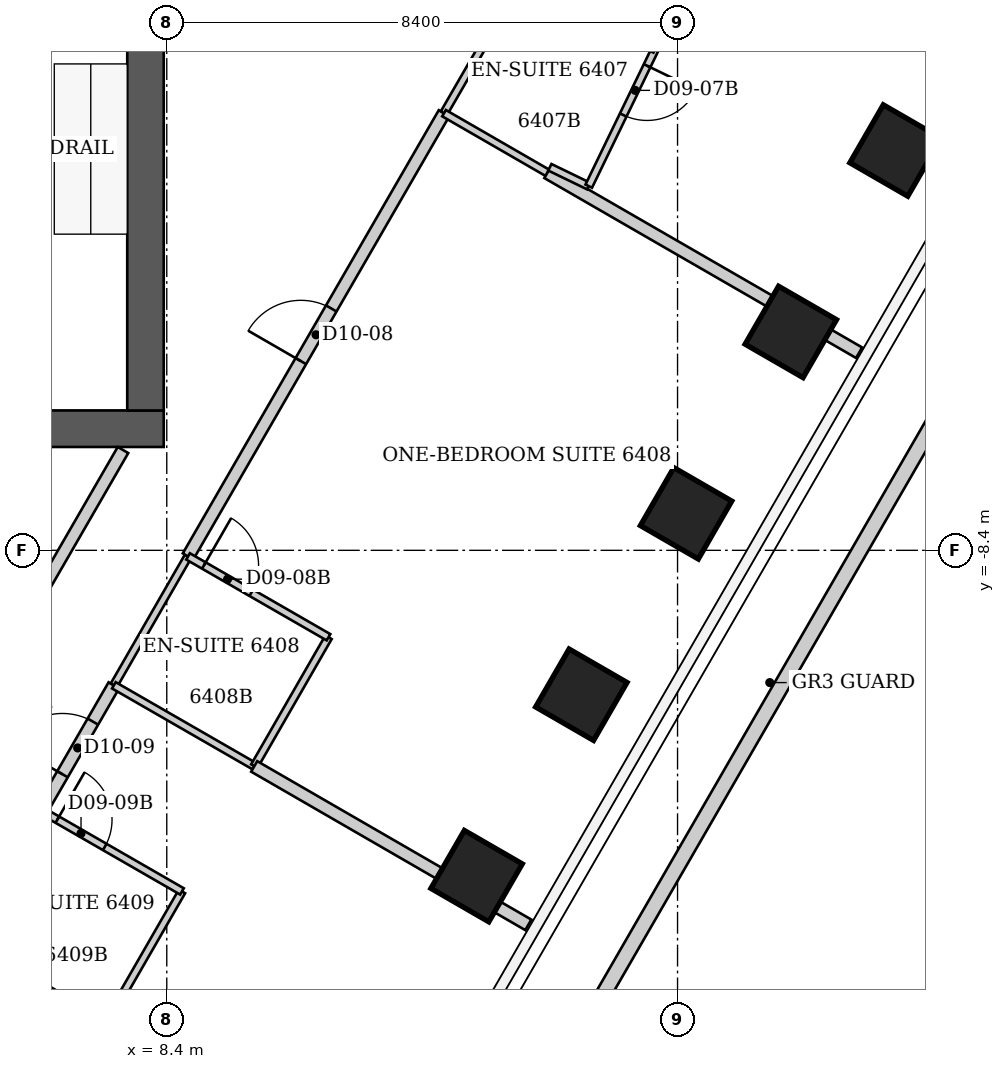
"""IFC4 building model, lengths in metres.
Left out: names, types, materials, properties, quantities, classifications, styles, units other than length and angle.
Written with IfcOpenShell. Run it as: python <this file> out.ifc"""

import sys

from ifc_helpers import new_model, si_unit, direction, frame, frame_2d, origin, origin_2d, place, context, subcontext, project, spatial, rectangle, extrude, clip, halfspace, element, fill, save


model = new_model("IFC4")
c1 = context("Model", 3, precision=1e-05, world=origin(), true_north=direction((0.0, 1.0)))
c2 = subcontext(c1, "Body", "Model", "MODEL_VIEW")
j1 = project(units=[si_unit("LENGTHUNIT", "METRE"), si_unit("PLANEANGLEUNIT", "RADIAN")], contexts=[c1])
p1 = place(None, origin())
s1 = spatial("IfcSite", under=j1, at=p1, CompositionType="ELEMENT")
p2 = place(p1, origin())
s2 = spatial("IfcBuilding", under=s1, at=p2, CompositionType="ELEMENT")
p3 = place(p2, frame((0.0, 0.0, 257.0)))
s3 = spatial("IfcBuildingStorey", under=s2, at=p3, CompositionType="ELEMENT", Elevation=257.0)
p4 = place(p3, frame((20.385, -1.824, -0.06), z_axis=(0.0, 0.0, 1.0), x_axis=(0.866025403784, -0.5, 0.0)))
e1 = element("IfcColumn", 1, at=p4, inside=s3, PredefinedType="COLUMN", context=c2, shape_type="SweptSolid", body=[
    clip(extrude(rectangle(XDim=1.1, YDim=1.1, at=origin_2d()), origin(), (0.0, 0.0, 1.0), 3.86), halfspace(frame((0.0, 0.0, 0.06)), True)),
])
p5 = place(p3, frame((18.663, -4.808, -0.052), z_axis=(0.0, 0.0, 1.0), x_axis=(0.866025403784, -0.5, 0.0)))
e2 = element("IfcColumn", 2, at=p5, inside=s3, PredefinedType="COLUMN", context=c2, shape_type="SweptSolid", body=[
    clip(extrude(rectangle(XDim=1.1, YDim=1.1, at=origin_2d()), origin(), (0.0, 0.0, 1.0), 3.852), halfspace(frame((0.0, 0.0, 0.052)), True)),
])
for number, where, z_axis, x_axis in (
    (3, (16.94, -7.792, -0.045), (0.0, 0.0, 1.0), (0.866, -0.5, 0.0)),
    (4, (15.218, -10.775, -0.045), (0.0, 0.0, 1.0), (0.866, -0.5, 0.0)),
):
    element("IfcColumn", number, at=place(p3, frame(where, z_axis=z_axis, x_axis=x_axis)), inside=s3, PredefinedType="COLUMN", context=c2, shape_type="SweptSolid", body=[
        clip(extrude(rectangle(XDim=1.1, YDim=1.1, at=origin_2d()), origin(), (0.0, 0.0, 1.0), 3.845), halfspace(frame((0.0, 0.0, 0.045)), True)),
    ])
p6 = place(p3, frame((13.495, -13.759, -0.052), z_axis=(0.0, 0.0, 1.0), x_axis=(0.866025403784, -0.5, 0.0)))
e5 = element("IfcColumn", 5, at=p6, inside=s3, PredefinedType="COLUMN", context=c2, shape_type="SweptSolid", body=[
    clip(extrude(rectangle(XDim=1.1, YDim=1.1, at=origin_2d()), origin(), (0.0, 0.0, 1.0), 3.852), halfspace(frame((0.0, 0.0, 0.052)), True)),
])
p7 = place(p3, frame((-8.35, -6.4, 0.0), z_axis=(0.0, 0.0, 1.0), x_axis=(1.0, 0.0, 0.0)))
e6 = element("IfcWall", 6, at=p7, inside=s3, PredefinedType="SHEAR", context=c2, shape_type="SweptSolid", body=[
    extrude(rectangle(XDim=16.7, YDim=0.6, at=frame_2d((8.35, 0.0))), origin(), (0.0, 0.0, 1.0), 3.8),
])
p8 = place(p3, frame((8.05, -6.1, 0.0), z_axis=(0.0, 0.0, 1.0), x_axis=(0.0, 1.0, 0.0)))
e7 = element("IfcWall", 7, at=p8, inside=s3, PredefinedType="SHEAR", context=c2, shape_type="SweptSolid", body=[
    extrude(rectangle(XDim=12.2, YDim=0.6, at=frame_2d((6.1, 0.0))), origin(), (0.0, 0.0, 1.0), 3.8),
])
p9 = place(p8, frame((7.6, 0.0, 0.0)))
e8 = element("IfcOpeningElement", 8, at=p9, cuts=e7, PredefinedType="OPENING", context=c2, shape_type="SweptSolid", body=[
    extrude(rectangle(XDim=1.2, YDim=2.2, at=frame_2d((0.6, 1.1))), frame((0.0, 0.3, 0.0), z_axis=(0.0, -1.0, 0.0), x_axis=(1.0, 0.0, 0.0)), (0.0, 0.0, 1.0), 0.6),
])
p10 = place(p3, frame((9.75, -25.8, 0.0), z_axis=(0.0, 0.0, 1.0), x_axis=(0.499998496786, 0.866026271663, 0.0)))
e9 = element("IfcWall", 9, at=p10, inside=s3, PredefinedType="PARAPET", context=c2, shape_type="SweptSolid", body=[
    extrude(rectangle(XDim=34.936, YDim=0.25, at=frame_2d((17.468, 0.0))), origin(), (0.0, 0.0, 1.0), 1.1),
])
p11 = place(p3, frame((5.233, -14.923, 0.0), z_axis=(0.0, 0.0, 1.0), x_axis=(0.864900876675, -0.501942699445, 0.0)))
e10 = element("IfcWall", 10, at=p11, inside=s3, PredefinedType="PARTITIONING", context=c2, shape_type="SweptSolid", body=[
    extrude(rectangle(XDim=2.505, YDim=0.12, at=frame_2d((1.252, 0.0))), origin(), (0.0, 0.0, 1.0), 3.038),
])
p12 = place(p3, frame((6.34, -12.68, 0.0), z_axis=(0.0, 0.0, 1.0), x_axis=(0.500222880675, 0.865896685321, 0.0)))
e11 = element("IfcWall", 11, at=p12, inside=s3, PredefinedType="PARTITIONING", context=c2, shape_type="SweptSolid", body=[
    extrude(rectangle(XDim=2.379, YDim=0.2, at=frame_2d((1.189, 0.0))), origin(), (0.0, 0.0, 1.0), 3.64),
])
p13 = place(p12, frame((0.689, 0.0, 0.0)))
e12 = element("IfcOpeningElement", 12, at=p13, cuts=e11, PredefinedType="OPENING", context=c2, shape_type="SweptSolid", body=[
    extrude(rectangle(XDim=1.0, YDim=2.13, at=frame_2d((0.5, 1.065))), frame((0.0, 0.1, 0.0), z_axis=(0.0, -1.0, 0.0), x_axis=(1.0, 0.0, 0.0)), (0.0, 0.0, 1.0), 0.2),
])
p14 = place(p3, frame((7.4, -16.18, 0.0), z_axis=(0.0, 0.0, 1.0), x_axis=(0.499159685399, 0.866510016372, 0.0)))
e13 = element("IfcWall", 13, at=p14, inside=s3, PredefinedType="PARTITIONING", context=c2, shape_type="SweptSolid", body=[
    extrude(rectangle(XDim=2.504, YDim=0.12, at=frame_2d((1.252, 0.0))), origin(), (0.0, 0.0, 1.0), 3.64),
])
p15 = place(p3, frame((7.53, -10.62, 0.0), z_axis=(0.0, 0.0, 1.0), x_axis=(0.498748634132, 0.866746675766, 0.0)))
e14 = element("IfcWall", 14, at=p15, inside=s3, PredefinedType="PARTITIONING", context=c2, shape_type="SweptSolid", body=[
    extrude(rectangle(XDim=2.446, YDim=0.12, at=frame_2d((1.223, 0.0))), origin(), (0.0, 0.0, 1.0), 3.64),
])
p16 = place(p3, frame((7.53, -10.62, 0.0), z_axis=(0.0, 0.0, 1.0), x_axis=(0.866654860089, -0.498908161372, 0.0)))
e15 = element("IfcWall", 15, at=p16, inside=s3, PredefinedType="PARTITIONING", context=c2, shape_type="SweptSolid", body=[
    extrude(rectangle(XDim=2.666, YDim=0.12, at=frame_2d((1.333, 0.0))), origin(), (0.0, 0.0, 1.0), 3.64),
])
p17 = place(p3, frame((7.68, -6.75, 0.0), z_axis=(0.0, 0.0, 1.0), x_axis=(-0.500174600737, -0.865924574532, 0.0)))
e16 = element("IfcWall", 16, at=p17, inside=s3, PredefinedType="PARTITIONING", context=c2, shape_type="SweptSolid", body=[
    extrude(rectangle(XDim=9.597, YDim=0.2, at=frame_2d((4.798, 0.0))), origin(), (0.0, 0.0, 1.0), 3.64),
])
p18 = place(p17, frame((4.248, 0.0, 0.0)))
e17 = element("IfcOpeningElement", 17, at=p18, cuts=e16, PredefinedType="OPENING", context=c2, shape_type="SweptSolid", body=[
    extrude(rectangle(XDim=1.1, YDim=2.2, at=frame_2d((0.55, 1.1))), frame((0.0, 0.1, 0.0), z_axis=(0.0, -1.0, 0.0), x_axis=(1.0, 0.0, 0.0)), (0.0, 0.0, 1.0), 0.2),
])
p19 = place(p3, frame((8.45, -24.382, 0.0), z_axis=(0.0, 0.0, 1.0), x_axis=(-0.328108256954, 0.944640128154, 0.0)))
e18 = element("IfcWall", 18, at=p19, inside=s3, PredefinedType="PARTITIONING", context=c2, shape_type="SweptSolid", body=[
    extrude(rectangle(XDim=10.059, YDim=0.2, at=frame_2d((5.029, 0.0))), origin(), (0.0, 0.0, 1.0), 3.64),
])
p20 = place(p3, frame((8.65, -14.01, 0.0), z_axis=(0.0, 0.0, 1.0), x_axis=(-0.866592449628, 0.499016559092, 0.0)))
e19 = element("IfcWall", 19, at=p20, inside=s3, PredefinedType="PARTITIONING", context=c2, shape_type="SweptSolid", body=[
    extrude(rectangle(XDim=2.665, YDim=0.12, at=frame_2d((1.333, 0.0))), origin(), (0.0, 0.0, 1.0), 3.64),
])
p21 = place(p20, frame((1.466, 0.0, 0.0)))
e20 = element("IfcOpeningElement", 20, at=p21, cuts=e19, PredefinedType="OPENING", context=c2, shape_type="SweptSolid", body=[
    extrude(rectangle(XDim=0.9, YDim=2.03, at=frame_2d((0.45, 1.015))), frame((0.0, 0.06, 0.0), z_axis=(0.0, -1.0, 0.0), x_axis=(1.0, 0.0, 0.0)), (0.0, 0.0, 1.0), 0.12),
])
p22 = place(p3, frame((8.75, -8.5, 0.0), z_axis=(0.0, 0.0, 1.0), x_axis=(0.500093981358, 0.865971136822, 0.0)))
e21 = element("IfcWall", 21, at=p22, inside=s3, PredefinedType="PARTITIONING", context=c2, shape_type="SweptSolid", body=[
    extrude(rectangle(XDim=8.418, YDim=0.2, at=frame_2d((4.209, 0.0))), origin(), (0.0, 0.0, 1.0), 3.64),
])
p23 = place(p22, frame((3.709, 0.0, 0.0)))
e22 = element("IfcOpeningElement", 22, at=p23, cuts=e21, PredefinedType="OPENING", context=c2, shape_type="SweptSolid", body=[
    extrude(rectangle(XDim=1.0, YDim=2.13, at=frame_2d((0.5, 1.065))), frame((0.0, 0.1, 0.0), z_axis=(0.0, -1.0, 0.0), x_axis=(1.0, 0.0, 0.0)), (0.0, 0.0, 1.0), 0.2),
])
p24 = place(p3, frame((9.84, -11.95, 0.0), z_axis=(0.0, 0.0, 1.0), x_axis=(0.498791783817, 0.866721844883, 0.0)))
e23 = element("IfcWall", 23, at=p24, inside=s3, PredefinedType="PARTITIONING", context=c2, shape_type="SweptSolid", body=[
    extrude(rectangle(XDim=2.446, YDim=0.12, at=frame_2d((1.223, 0.0))), origin(), (0.0, 0.0, 1.0), 3.64),
])
p25 = place(p3, frame((11.06, -9.83, 0.0), z_axis=(0.0, 0.0, 1.0), x_axis=(-0.866615255992, 0.498976951453, 0.0)))
e24 = element("IfcWall", 24, at=p25, inside=s3, PredefinedType="PARTITIONING", context=c2, shape_type="SweptSolid", body=[
    extrude(rectangle(XDim=2.666, YDim=0.12, at=frame_2d((1.333, 0.0))), origin(), (0.0, 0.0, 1.0), 3.64),
])
p26 = place(p25, frame((1.466, 0.0, 0.0)))
e25 = element("IfcOpeningElement", 25, at=p26, cuts=e24, PredefinedType="OPENING", context=c2, shape_type="SweptSolid", body=[
    extrude(rectangle(XDim=0.9, YDim=2.03, at=frame_2d((0.45, 1.015))), frame((0.0, 0.06, 0.0), z_axis=(0.0, -1.0, 0.0), x_axis=(1.0, 0.0, 0.0)), (0.0, 0.0, 1.0), 0.12),
])
p27 = place(p3, frame((12.959, -1.209, 0.0), z_axis=(0.0, 0.0, 1.0), x_axis=(0.500472725713, 0.865752303385, 0.0)))
e26 = element("IfcWall", 26, at=p27, inside=s3, PredefinedType="PARTITIONING", context=c2, shape_type="SweptSolid", body=[
    extrude(rectangle(XDim=2.459, YDim=0.12, at=frame_2d((1.23, 0.0))), origin(), (0.0, 0.0, 1.0), 3.64),
])
p28 = place(p3, frame((12.96, -1.21, 0.0), z_axis=(0.0, 0.0, 1.0), x_axis=(0.866075784294, -0.499912728242, 0.0)))
e27 = element("IfcWall", 27, at=p28, inside=s3, PredefinedType="PARTITIONING", context=c2, shape_type="SweptSolid", body=[
    extrude(rectangle(XDim=1.962, YDim=0.12, at=frame_2d((0.981, 0.0))), origin(), (0.0, 0.0, 1.0), 3.64),
])
p29 = place(p3, frame((14.346, -14.56, 0.0), z_axis=(0.0, 0.0, 1.0), x_axis=(-0.86575990496, 0.500459575754, 0.0)))
e28 = element("IfcWall", 28, at=p29, inside=s3, PredefinedType="PARTITIONING", context=c2, shape_type="SweptSolid", body=[
    extrude(rectangle(XDim=5.208, YDim=0.2, at=frame_2d((2.604, 0.0))), origin(), (0.0, 0.0, 1.0), 3.64),
])
p30 = place(p3, frame((14.659, -2.191, 0.0), z_axis=(0.0, 0.0, 1.0), x_axis=(0.866075017274, -0.499914057068, 0.0)))
e29 = element("IfcWall", 29, at=p30, inside=s3, PredefinedType="PARTITIONING", context=c2, shape_type="SweptSolid", body=[
    extrude(rectangle(XDim=5.919, YDim=0.2, at=frame_2d((2.96, 0.0))), origin(), (0.0, 0.0, 1.0), 3.64),
])
p31 = place(p3, frame((14.7, -2.1, 0.0), z_axis=(0.0, 0.0, 1.0), x_axis=(0.900120171182, -0.43564168468, 0.0)))
e30 = element("IfcWall", 30, at=p31, inside=s3, PredefinedType="PARTITIONING", context=c2, shape_type="SweptSolid", body=[
    extrude(rectangle(XDim=0.711, YDim=0.12, at=frame_2d((0.355, 0.0))), origin(), (0.0, 0.0, 1.0), 3.64),
])
p32 = place(p3, frame((15.34, -2.41, 0.0), z_axis=(0.0, 0.0, 1.0), x_axis=(0.435928453727, 0.899981323824, 0.0)))
e31 = element("IfcWall", 31, at=p32, inside=s3, PredefinedType="PARTITIONING", context=c2, shape_type="SweptSolid", body=[
    extrude(rectangle(XDim=2.5, YDim=0.12, at=frame_2d((1.25, 0.0))), origin(), (0.0, 0.0, 1.0), 3.64),
])
p33 = place(p32, frame((1.3, 0.0, 0.0)))
e32 = element("IfcOpeningElement", 32, at=p33, cuts=e31, PredefinedType="OPENING", context=c2, shape_type="SweptSolid", body=[
    extrude(rectangle(XDim=0.9, YDim=2.03, at=frame_2d((0.45, 1.015))), frame((0.0, 0.06, 0.0), z_axis=(0.0, -1.0, 0.0), x_axis=(1.0, 0.0, 0.0)), (0.0, 0.0, 1.0), 0.12),
])
p34 = place(p3, frame((16.43, -0.16, 0.0), z_axis=(0.0, 0.0, 1.0), x_axis=(-0.900794056548, 0.434246551729, 0.0)))
e33 = element("IfcWall", 33, at=p34, inside=s3, PredefinedType="PARTITIONING", context=c2, shape_type="SweptSolid", body=[
    extrude(rectangle(XDim=2.487, YDim=0.12, at=frame_2d((1.243, 0.0))), origin(), (0.0, 0.0, 1.0), 3.64),
])
p35 = place(p33, origin())
e34 = element("IfcDoor", 34, at=p35, inside=s3, OperationType="SINGLE_SWING_RIGHT", PredefinedType="DOOR", context=c2, shape_type="SweptSolid", body=[
    extrude(rectangle(XDim=0.9, YDim=2.03, at=frame_2d((0.45, 1.015))), frame((0.0, 0.025, 0.0), z_axis=(0.0, -1.0, 0.0), x_axis=(1.0, 0.0, 0.0)), (0.0, 0.0, 1.0), 0.05),
])
fill(e32, e34)
p36 = place(p23, origin())
e35 = element("IfcDoor", 35, at=p36, inside=s3, OperationType="SINGLE_SWING_LEFT", PredefinedType="DOOR", context=c2, shape_type="SweptSolid", body=[
    extrude(rectangle(XDim=1.0, YDim=2.13, at=frame_2d((0.5, 1.065))), frame((0.0, 0.025, 0.0), z_axis=(0.0, -1.0, 0.0), x_axis=(1.0, 0.0, 0.0)), (0.0, 0.0, 1.0), 0.05),
])
fill(e22, e35)
p37 = place(p26, origin())
e36 = element("IfcDoor", 36, at=p37, inside=s3, OperationType="SINGLE_SWING_RIGHT", PredefinedType="DOOR", context=c2, shape_type="SweptSolid", body=[
    extrude(rectangle(XDim=0.9, YDim=2.03, at=frame_2d((0.45, 1.015))), frame((0.0, 0.025, 0.0), z_axis=(0.0, -1.0, 0.0), x_axis=(1.0, 0.0, 0.0)), (0.0, 0.0, 1.0), 0.05),
])
fill(e25, e36)
p38 = place(p13, origin())
e37 = element("IfcDoor", 37, at=p38, inside=s3, OperationType="SINGLE_SWING_LEFT", PredefinedType="DOOR", context=c2, shape_type="SweptSolid", body=[
    extrude(rectangle(XDim=1.0, YDim=2.13, at=frame_2d((0.5, 1.065))), frame((0.0, 0.025, 0.0), z_axis=(0.0, -1.0, 0.0), x_axis=(1.0, 0.0, 0.0)), (0.0, 0.0, 1.0), 0.05),
])
fill(e12, e37)
p39 = place(p21, origin())
e38 = element("IfcDoor", 38, at=p39, inside=s3, OperationType="SINGLE_SWING_RIGHT", PredefinedType="DOOR", context=c2, shape_type="SweptSolid", body=[
    extrude(rectangle(XDim=0.9, YDim=2.03, at=frame_2d((0.45, 1.015))), frame((0.0, 0.025, 0.0), z_axis=(0.0, -1.0, 0.0), x_axis=(1.0, 0.0, 0.0)), (0.0, 0.0, 1.0), 0.05),
])
fill(e20, e38)
save(model, sys.argv[1])
